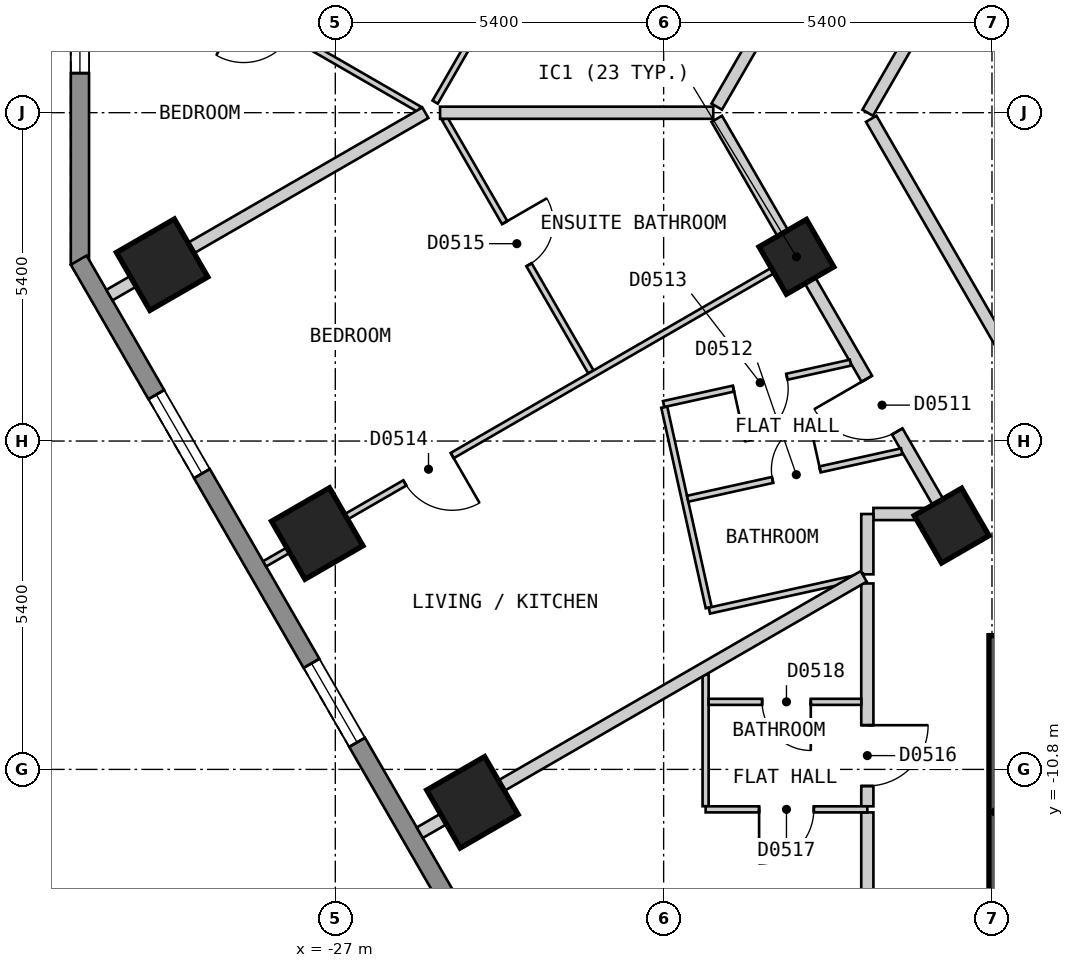
"""IFC4 building model, lengths in metres.
Left out: names, types, materials, properties, quantities, classifications, styles, units other than length and angle.
Written with IfcOpenShell. Run it as: python <this file> out.ifc"""

import sys

from ifc_helpers import new_model, si_unit, direction, frame, frame_2d, origin, origin_2d, place, context, subcontext, project, spatial, polyline, rectangle, outline, extrude, element, fill, save


model = new_model("IFC4")
c1 = context("Model", 3, precision=1e-05, world=origin(), true_north=direction((0.0, 1.0)))
c2 = subcontext(c1, "Body", "Model", "MODEL_VIEW")
j1 = project(units=[si_unit("LENGTHUNIT", "METRE"), si_unit("PLANEANGLEUNIT", "RADIAN")], contexts=[c1])
p1 = place(None, origin())
s1 = spatial("IfcSite", under=j1, at=p1, CompositionType="ELEMENT")
p2 = place(p1, origin())
s2 = spatial("IfcBuilding", under=s1, at=p2, CompositionType="ELEMENT")
p3 = place(p2, frame((0.0, 0.0, 44.4)))
s3 = spatial("IfcBuildingStorey", under=s2, at=p3, CompositionType="ELEMENT", Elevation=44.4)
for number, where, z_axis, x_axis in (
    (1, (-29.848, -2.5, 0.0), (0.0, 0.0, 1.0), (0.5, -0.866, 0.0)),
    (2, (-27.297, -6.921, 0.0), (0.0, 0.0, 1.0), (0.5, -0.866, 0.0)),
    (3, (-24.745, -11.341, 0.0), (0.0, 0.0, 1.0), (0.5, -0.866, 0.0)),
):
    element("IfcColumn", number, at=place(p3, frame(where, z_axis=z_axis, x_axis=x_axis)), inside=s3, PredefinedType="COLUMN", context=c2, shape_type="SweptSolid", body=[
        extrude(rectangle(XDim=1.1, YDim=1.1, at=origin_2d()), origin(), (0.0, 0.0, 1.0), 3.0),
    ])
for number, where, z_axis, x_axis in (
    (4, (-19.416, -2.371, 0.0), (0.0, 0.0, 1.0), (0.5, -0.866, 0.0)),
    (5, (-16.864, -6.791, 0.0), (0.0, 0.0, 1.0), (0.5, -0.866, 0.0)),
):
    element("IfcColumn", number, at=place(p3, frame(where, z_axis=z_axis, x_axis=x_axis)), inside=s3, PredefinedType="COLUMN", context=c2, shape_type="SweptSolid", body=[
        extrude(rectangle(XDim=0.9, YDim=0.9, at=origin_2d()), origin(), (0.0, 0.0, 1.0), 3.0),
    ])
p4 = place(p3, frame((-31.2, 2.5, 0.0), z_axis=(0.0, 0.0, 1.0), x_axis=(0.0, -1.0, 0.0)))
e6 = element("IfcWall", 6, at=p4, inside=s3, PredefinedType="SOLIDWALL", context=c2, shape_type="SweptSolid", body=[
    extrude(outline(polyline([(0.0, -0.15), (5.0, -0.15), (4.92, 0.15), (0.08, 0.15), (0.0, -0.15)])), origin(), (0.0, 0.0, 1.0), 2.7),
])
p5 = place(p4, frame((0.65, 0.0, 0.15)))
e7 = element("IfcOpeningElement", 7, at=p5, cuts=e6, PredefinedType="OPENING", context=c2, shape_type="SweptSolid", body=[
    extrude(rectangle(XDim=1.2, YDim=2.1, at=frame_2d((0.6, 1.05))), frame((0.0, 0.16, 0.0), z_axis=(0.0, -1.0, 0.0), x_axis=(1.0, 0.0, 0.0)), (0.0, 0.0, 1.0), 0.32),
])
p6 = place(p3, frame((-31.22, -2.425, 0.0), z_axis=(0.0, 0.0, 1.0), x_axis=(0.500001938803, -0.866024284413, 0.0)))
e8 = element("IfcWall", 8, at=p6, inside=s3, PredefinedType="SOLIDWALL", context=c2, shape_type="SweptSolid", body=[
    extrude(outline(polyline([(0.0, -0.15), (27.02, -0.15), (26.94, 0.15), (0.08, 0.15), (0.0, -0.15)])), origin(), (0.0, 0.0, 1.0), 2.7),
])
p7 = place(p6, frame((2.553, 0.0, 0.15)))
e9 = element("IfcOpeningElement", 9, at=p7, cuts=e8, PredefinedType="OPENING", context=c2, shape_type="SweptSolid", body=[
    extrude(rectangle(XDim=1.5, YDim=2.1, at=frame_2d((0.75, 1.05))), frame((0.0, 0.16, 0.0), z_axis=(0.0, -1.0, 0.0), x_axis=(1.0, 0.0, 0.0)), (0.0, 0.0, 1.0), 0.32),
])
p8 = place(p6, frame((7.657, 0.0, 0.15)))
e10 = element("IfcOpeningElement", 10, at=p8, cuts=e8, PredefinedType="OPENING", context=c2, shape_type="SweptSolid", body=[
    extrude(rectangle(XDim=1.5, YDim=2.1, at=frame_2d((0.75, 1.05))), frame((0.0, 0.16, 0.0), z_axis=(0.0, -1.0, 0.0), x_axis=(1.0, 0.0, 0.0)), (0.0, 0.0, 1.0), 0.32),
])
p9 = place(p6, frame((12.761, 0.0, 0.15)))
e11 = element("IfcOpeningElement", 11, at=p9, cuts=e8, PredefinedType="OPENING", context=c2, shape_type="SweptSolid", body=[
    extrude(rectangle(XDim=1.5, YDim=2.1, at=frame_2d((0.75, 1.05))), frame((0.0, 0.16, 0.0), z_axis=(0.0, -1.0, 0.0), x_axis=(1.0, 0.0, 0.0)), (0.0, 0.0, 1.0), 0.32),
])
p10 = place(p6, frame((17.865, 0.0, 0.15)))
e12 = element("IfcOpeningElement", 12, at=p10, cuts=e8, PredefinedType="OPENING", context=c2, shape_type="SweptSolid", body=[
    extrude(rectangle(XDim=1.5, YDim=2.1, at=frame_2d((0.75, 1.05))), frame((0.0, 0.16, 0.0), z_axis=(0.0, -1.0, 0.0), x_axis=(1.0, 0.0, 0.0)), (0.0, 0.0, 1.0), 0.32),
])
p11 = place(p6, frame((22.969, 0.0, 0.15)))
e13 = element("IfcOpeningElement", 13, at=p11, cuts=e8, PredefinedType="OPENING", context=c2, shape_type="SweptSolid", body=[
    extrude(rectangle(XDim=1.5, YDim=2.1, at=frame_2d((0.75, 1.05))), frame((0.0, 0.16, 0.0), z_axis=(0.0, -1.0, 0.0), x_axis=(1.0, 0.0, 0.0)), (0.0, 0.0, 1.0), 0.32),
])
p12 = place(p3, frame((-18.186, -0.101, 0.0), z_axis=(0.0, 0.0, 1.0), x_axis=(0.499997591167, -0.86602679452, 0.0)))
e14 = element("IfcWall", 14, at=p12, inside=s3, PredefinedType="PARTITIONING", context=c2, shape_type="SweptSolid", body=[
    extrude(rectangle(XDim=5.172, YDim=0.2, at=frame_2d((2.586, 0.0))), origin(), (0.0, 0.0, 1.0), 2.7),
])
p13 = place(p3, frame((-20.727, -0.101, 0.0), z_axis=(0.0, 0.0, 1.0), x_axis=(0.500065652488, -0.865987495984, 0.0)))
e15 = element("IfcWall", 15, at=p13, inside=s3, PredefinedType="PARTITIONING", context=c2, shape_type="SweptSolid", body=[
    extrude(rectangle(XDim=7.389, YDim=0.2, at=frame_2d((3.695, 0.0))), origin(), (0.0, 0.0, 1.0), 2.7),
])
p14 = place(p13, frame((4.937, 0.0, 0.0)))
e16 = element("IfcOpeningElement", 16, at=p14, cuts=e15, PredefinedType="OPENING", context=c2, shape_type="SweptSolid", body=[
    extrude(rectangle(XDim=1.0, YDim=2.1, at=frame_2d((0.5, 1.05))), frame((0.0, 0.11, 0.0), z_axis=(0.0, -1.0, 0.0), x_axis=(1.0, 0.0, 0.0)), (0.0, 0.0, 1.0), 0.22),
])
p15 = place(p3, frame((-18.25, -11.507, 0.0), z_axis=(0.0, 0.0, 1.0), x_axis=(0.0, -1.0, 0.0)))
e17 = element("IfcWall", 17, at=p15, inside=s3, PredefinedType="PARTITIONING", context=c2, shape_type="SweptSolid", body=[
    extrude(rectangle(XDim=4.792, YDim=0.2, at=frame_2d((2.396, 0.0))), origin(), (0.0, 0.0, 1.0), 2.7),
])
p16 = place(p3, frame((-18.15, -6.6, 0.0), z_axis=(0.0, 0.0, 1.0), x_axis=(1.0, 0.0, 0.0)))
e18 = element("IfcWall", 18, at=p16, inside=s3, PredefinedType="PARTITIONING", context=c2, shape_type="SweptSolid", body=[
    extrude(rectangle(XDim=1.176, YDim=0.2, at=frame_2d((0.588, 0.0))), origin(), (0.0, 0.0, 1.0), 2.7),
])
p17 = place(p3, frame((-18.244, -0.001, 0.0), z_axis=(0.0, 0.0, 1.0), x_axis=(0.499962999376, 0.866046765051, 0.0)))
e19 = element("IfcWall", 19, at=p17, inside=s3, PredefinedType="PARTITIONING", context=c2, shape_type="SweptSolid", body=[
    extrude(rectangle(XDim=18.245, YDim=0.2, at=frame_2d((9.123, 0.0))), origin(), (0.0, 0.0, 1.0), 2.7),
])
p18 = place(p17, frame((8.672, 0.0, 0.0)))
e20 = element("IfcOpeningElement", 20, at=p18, cuts=e19, PredefinedType="OPENING", context=c2, shape_type="SweptSolid", body=[
    extrude(rectangle(XDim=0.9, YDim=2.1, at=frame_2d((0.45, 1.05))), frame((0.0, 0.11, 0.0), z_axis=(0.0, -1.0, 0.0), x_axis=(1.0, 0.0, 0.0)), (0.0, 0.0, 1.0), 0.22),
])
p19 = place(p3, frame((-20.727, 0.099, 0.0), z_axis=(0.0, 0.0, 1.0), x_axis=(0.499993204491, 0.866029327138, 0.0)))
e21 = element("IfcWall", 21, at=p19, inside=s3, PredefinedType="PARTITIONING", context=c2, shape_type="SweptSolid", body=[
    extrude(rectangle(XDim=20.554, YDim=0.2, at=frame_2d((10.277, 0.0))), origin(), (0.0, 0.0, 1.0), 2.7),
])
p20 = place(p19, frame((9.776, 0.0, 0.0)))
e22 = element("IfcOpeningElement", 22, at=p20, cuts=e21, PredefinedType="OPENING", context=c2, shape_type="SweptSolid", body=[
    extrude(rectangle(XDim=1.0, YDim=2.1, at=frame_2d((0.5, 1.05))), frame((0.0, 0.11, 0.0), z_axis=(0.0, -1.0, 0.0), x_axis=(1.0, 0.0, 0.0)), (0.0, 0.0, 1.0), 0.22),
])
p21 = place(p19, frame((4.673, 0.0, 0.0)))
e23 = element("IfcOpeningElement", 23, at=p21, cuts=e21, PredefinedType="OPENING", context=c2, shape_type="SweptSolid", body=[
    extrude(rectangle(XDim=1.0, YDim=2.1, at=frame_2d((0.5, 1.05))), frame((0.0, 0.11, 0.0), z_axis=(0.0, -1.0, 0.0), x_axis=(1.0, 0.0, 0.0)), (0.0, 0.0, 1.0), 0.22),
])
p22 = place(p19, frame((14.88, 0.0, 0.0)))
e24 = element("IfcOpeningElement", 24, at=p22, cuts=e21, PredefinedType="OPENING", context=c2, shape_type="SweptSolid", body=[
    extrude(rectangle(XDim=1.0, YDim=2.1, at=frame_2d((0.5, 1.05))), frame((0.0, 0.11, 0.0), z_axis=(0.0, -1.0, 0.0), x_axis=(1.0, 0.0, 0.0)), (0.0, 0.0, 1.0), 0.22),
])
p23 = place(p3, frame((-18.25, -11.407, 0.0), z_axis=(0.0, 0.0, 1.0), x_axis=(0.0, 1.0, 0.0)))
e25 = element("IfcWall", 25, at=p23, inside=s3, PredefinedType="PARTITIONING", context=c2, shape_type="SweptSolid", body=[
    extrude(rectangle(XDim=3.665, YDim=0.2, at=frame_2d((1.833, 0.0))), origin(), (0.0, 0.0, 1.0), 2.7),
])
p24 = place(p23, frame((0.334, 0.0, 0.0)))
e26 = element("IfcOpeningElement", 26, at=p24, cuts=e25, PredefinedType="OPENING", context=c2, shape_type="SweptSolid", body=[
    extrude(rectangle(XDim=1.0, YDim=2.1, at=frame_2d((0.5, 1.05))), frame((0.0, 0.11, 0.0), z_axis=(0.0, -1.0, 0.0), x_axis=(1.0, 0.0, 0.0)), (0.0, 0.0, 1.0), 0.22),
])
p25 = place(p3, frame((-18.25, -7.592, 0.0), z_axis=(0.0, 0.0, 1.0), x_axis=(0.0, 1.0, 0.0)))
e27 = element("IfcWall", 27, at=p25, inside=s3, PredefinedType="PARTITIONING", context=c2, shape_type="SweptSolid", body=[
    extrude(rectangle(XDim=0.992, YDim=0.2, at=frame_2d((0.496, 0.0))), origin(), (0.0, 0.0, 1.0), 2.7),
])
p26 = place(p3, frame((-25.2, -0.101, 0.0), z_axis=(0.0, 0.0, 1.0), x_axis=(0.500099052605, -0.865968208183, 0.0)))
e28 = element("IfcWall", 28, at=p26, inside=s3, PredefinedType="PARTITIONING", context=c2, shape_type="SweptSolid", body=[
    extrude(rectangle(XDim=4.807, YDim=0.1, at=frame_2d((2.404, 0.0))), origin(), (0.0, 0.0, 1.0), 2.7),
])
p27 = place(p26, frame((1.971, 0.0, 0.0)))
e29 = element("IfcOpeningElement", 29, at=p27, cuts=e28, PredefinedType="OPENING", context=c2, shape_type="SweptSolid", body=[
    extrude(rectangle(XDim=0.8, YDim=2.1, at=frame_2d((0.4, 1.05))), frame((0.0, 0.06, 0.0), z_axis=(0.0, -1.0, 0.0), x_axis=(1.0, 0.0, 0.0)), (0.0, 0.0, 1.0), 0.12),
])
p28 = place(p3, frame((-21.59, -4.842, 0.0), z_axis=(0.0, 0.0, 1.0), x_axis=(0.216524734289, -0.976277132499, 0.0)))
e30 = element("IfcWall", 30, at=p28, inside=s3, PredefinedType="PARTITIONING", context=c2, shape_type="SweptSolid", body=[
    extrude(rectangle(XDim=3.377, YDim=0.1, at=frame_2d((1.688, 0.0))), origin(), (0.0, 0.0, 1.0), 2.7),
])
p29 = place(p3, frame((-20.91, -9.243, 0.0), z_axis=(0.0, 0.0, 1.0), x_axis=(0.0, -1.0, 0.0)))
e31 = element("IfcWall", 31, at=p29, inside=s3, PredefinedType="PARTITIONING", context=c2, shape_type="SweptSolid", body=[
    extrude(rectangle(XDim=2.163, YDim=0.1, at=frame_2d((1.082, 0.0))), origin(), (0.0, 0.0, 1.0), 2.7),
])
p30 = place(p3, frame((-30.716, 2.999, 0.0), z_axis=(0.0, 0.0, 1.0), x_axis=(0.866025981722, -0.499998998981, 0.0)))
e32 = element("IfcWall", 32, at=p30, inside=s3, PredefinedType="PARTITIONING", context=c2, shape_type="SweptSolid", body=[
    extrude(rectangle(XDim=5.884, YDim=0.1, at=frame_2d((2.942, 0.0))), origin(), (0.0, 0.0, 1.0), 2.7),
])
p31 = place(p30, frame((2.55, 0.0, 0.0)))
e33 = element("IfcOpeningElement", 33, at=p31, cuts=e32, PredefinedType="OPENING", context=c2, shape_type="SweptSolid", body=[
    extrude(rectangle(XDim=0.9, YDim=2.1, at=frame_2d((0.45, 1.05))), frame((0.0, 0.06, 0.0), z_axis=(0.0, -1.0, 0.0), x_axis=(1.0, 0.0, 0.0)), (0.0, 0.0, 1.0), 0.12),
])
p32 = place(p3, frame((-20.86, -9.689, 0.0), z_axis=(0.0, 0.0, 1.0), x_axis=(1.0, 0.0, 0.0)))
e34 = element("IfcWall", 34, at=p32, inside=s3, PredefinedType="PARTITIONING", context=c2, shape_type="SweptSolid", body=[
    extrude(rectangle(XDim=2.51, YDim=0.1, at=frame_2d((1.255, 0.0))), origin(), (0.0, 0.0, 1.0), 2.7),
])
p33 = place(p32, frame((0.88, 0.0, 0.0)))
e35 = element("IfcOpeningElement", 35, at=p33, cuts=e34, PredefinedType="OPENING", context=c2, shape_type="SweptSolid", body=[
    extrude(rectangle(XDim=0.8, YDim=2.1, at=frame_2d((0.4, 1.05))), frame((0.0, 0.06, 0.0), z_axis=(0.0, -1.0, 0.0), x_axis=(1.0, 0.0, 0.0)), (0.0, 0.0, 1.0), 0.12),
])
p34 = place(p3, frame((-20.909, -11.457, 0.0), z_axis=(0.0, 0.0, 1.0), x_axis=(1.0, 0.0, 0.0)))
e36 = element("IfcWall", 36, at=p34, inside=s3, PredefinedType="PARTITIONING", context=c2, shape_type="SweptSolid", body=[
    extrude(rectangle(XDim=2.659, YDim=0.1, at=frame_2d((1.33, 0.0))), origin(), (0.0, 0.0, 1.0), 2.7),
])
p35 = place(p34, frame((0.879, 0.0, 0.0)))
e37 = element("IfcOpeningElement", 37, at=p35, cuts=e36, PredefinedType="OPENING", context=c2, shape_type="SweptSolid", body=[
    extrude(rectangle(XDim=0.9, YDim=2.1, at=frame_2d((0.45, 1.05))), frame((0.0, 0.06, 0.0), z_axis=(0.0, -1.0, 0.0), x_axis=(1.0, 0.0, 0.0)), (0.0, 0.0, 1.0), 0.12),
])
p36 = place(p3, frame((-25.358, 0.173, 0.0), z_axis=(0.0, 0.0, 1.0), x_axis=(0.500180754623, 0.8659210199, 0.0)))
e38 = element("IfcWall", 38, at=p36, inside=s3, PredefinedType="PARTITIONING", context=c2, shape_type="SweptSolid", body=[
    extrude(rectangle(XDim=4.872, YDim=0.1, at=frame_2d((2.436, 0.0))), origin(), (0.0, 0.0, 1.0), 2.7),
])
p37 = place(p36, frame((1.936, 0.0, 0.0)))
e39 = element("IfcOpeningElement", 39, at=p37, cuts=e38, PredefinedType="OPENING", context=c2, shape_type="SweptSolid", body=[
    extrude(rectangle(XDim=0.8, YDim=2.1, at=frame_2d((0.4, 1.05))), frame((0.0, 0.06, 0.0), z_axis=(0.0, -1.0, 0.0), x_axis=(1.0, 0.0, 0.0)), (0.0, 0.0, 1.0), 0.12),
])
p38 = place(p3, frame((-20.848, -8.189, 0.0), z_axis=(0.0, 0.0, 1.0), x_axis=(0.976266547712, 0.216572453971, 0.0)))
e40 = element("IfcWall", 40, at=p38, inside=s3, PredefinedType="PARTITIONING", context=c2, shape_type="SweptSolid", body=[
    extrude(rectangle(XDim=2.6, YDim=0.1, at=frame_2d((1.3, 0.0))), origin(), (0.0, 0.0, 1.0), 2.7),
])
p39 = place(p3, frame((-21.205, -6.349, 0.0), z_axis=(0.0, 0.0, 1.0), x_axis=(0.976315944397, 0.216349663084, 0.0)))
e41 = element("IfcWall", 41, at=p39, inside=s3, PredefinedType="PARTITIONING", context=c2, shape_type="SweptSolid", body=[
    extrude(rectangle(XDim=3.605, YDim=0.1, at=frame_2d((1.803, 0.0))), origin(), (0.0, 0.0, 1.0), 2.7),
])
p40 = place(p39, frame((1.43, 0.0, 0.0)))
e42 = element("IfcOpeningElement", 42, at=p40, cuts=e41, PredefinedType="OPENING", context=c2, shape_type="SweptSolid", body=[
    extrude(rectangle(XDim=0.8, YDim=2.1, at=frame_2d((0.4, 1.05))), frame((0.0, 0.06, 0.0), z_axis=(0.0, -1.0, 0.0), x_axis=(1.0, 0.0, 0.0)), (0.0, 0.0, 1.0), 0.12),
])
p41 = place(p3, frame((-21.6, -4.792, 0.0), z_axis=(0.0, 0.0, 1.0), x_axis=(0.976320106661, 0.216330879278, 0.0)))
e43 = element("IfcWall", 43, at=p41, inside=s3, PredefinedType="PARTITIONING", context=c2, shape_type="SweptSolid", body=[
    extrude(rectangle(XDim=3.147, YDim=0.1, at=frame_2d((1.574, 0.0))), origin(), (0.0, 0.0, 1.0), 2.7),
])
p42 = place(p41, frame((1.176, 0.0, 0.0)))
e44 = element("IfcOpeningElement", 44, at=p42, cuts=e43, PredefinedType="OPENING", context=c2, shape_type="SweptSolid", body=[
    extrude(rectangle(XDim=0.9, YDim=2.1, at=frame_2d((0.45, 1.05))), frame((0.0, 0.06, 0.0), z_axis=(0.0, -1.0, 0.0), x_axis=(1.0, 0.0, 0.0)), (0.0, 0.0, 1.0), 0.12),
])
p43 = place(p3, frame((-28.163, -7.42, 0.0), z_axis=(0.0, 0.0, 1.0), x_axis=(0.866065245018, 0.499930986609, 0.0)))
e45 = element("IfcWall", 45, at=p43, inside=s3, PredefinedType="PARTITIONING", context=c2, shape_type="SweptSolid", body=[
    extrude(rectangle(XDim=10.0, YDim=0.1, at=frame_2d((5.0, 0.0))), origin(), (0.0, 0.0, 1.0), 2.7),
])
p44 = place(p43, frame((2.663, 0.0, 0.0)))
e46 = element("IfcOpeningElement", 46, at=p44, cuts=e45, PredefinedType="OPENING", context=c2, shape_type="SweptSolid", body=[
    extrude(rectangle(XDim=0.9, YDim=2.1, at=frame_2d((0.45, 1.05))), frame((0.0, 0.06, 0.0), z_axis=(0.0, -1.0, 0.0), x_axis=(1.0, 0.0, 0.0)), (0.0, 0.0, 1.0), 0.12),
])
p45 = place(p3, frame((-25.277, -0.001, 0.0), z_axis=(0.0, 0.0, 1.0), x_axis=(1.0, 0.0, 0.0)))
e47 = element("IfcWall", 47, at=p45, inside=s3, PredefinedType="PARTITIONING", context=c2, shape_type="SweptSolid", body=[
    extrude(rectangle(XDim=4.493, YDim=0.2, at=frame_2d((2.247, 0.0))), origin(), (0.0, 0.0, 1.0), 2.7),
])
p46 = place(p3, frame((-30.715, -3.0, 0.0), z_axis=(0.0, 0.0, 1.0), x_axis=(0.86609140076, 0.499885672459, 0.0)))
e48 = element("IfcWall", 48, at=p46, inside=s3, PredefinedType="PARTITIONING", context=c2, shape_type="SweptSolid", body=[
    extrude(rectangle(XDim=6.0, YDim=0.2, at=frame_2d((3.0, 0.0))), origin(), (0.0, 0.0, 1.0), 2.7),
])
p47 = place(p3, frame((-25.61, -11.841, 0.0), z_axis=(0.0, 0.0, 1.0), x_axis=(0.866004715254, 0.500035831874, 0.0)))
e49 = element("IfcWall", 49, at=p47, inside=s3, PredefinedType="PARTITIONING", context=c2, shape_type="SweptSolid", body=[
    extrude(rectangle(XDim=8.43, YDim=0.2, at=frame_2d((4.215, 0.0))), origin(), (0.0, 0.0, 1.0), 2.7),
])
p48 = place(p3, frame((-16.15, -14.4, 0.0), z_axis=(0.0, 0.0, 1.0), x_axis=(0.0, 1.0, 0.0)))
e50 = element("IfcWall", 50, at=p48, inside=s3, PredefinedType="SOLIDWALL", context=c2, shape_type="SweptSolid", body=[
    extrude(rectangle(XDim=5.8, YDim=0.2, at=frame_2d((2.9, 0.0))), origin(), (0.0, 0.0, 1.0), 2.7),
])
p49 = place(p5, origin())
e51 = element("IfcWindow", 51, at=p49, inside=s3, PartitioningType="SINGLE_PANEL", PredefinedType="WINDOW", context=c2, shape_type="SweptSolid", body=[
    extrude(rectangle(XDim=1.2, YDim=2.1, at=frame_2d((0.6, 1.05))), frame((0.0, 0.03, 0.0), z_axis=(0.0, -1.0, 0.0), x_axis=(1.0, 0.0, 0.0)), (0.0, 0.0, 1.0), 0.06),
])
fill(e7, e51)
p50 = place(p7, origin())
e52 = element("IfcWindow", 52, at=p50, inside=s3, PartitioningType="SINGLE_PANEL", PredefinedType="WINDOW", context=c2, shape_type="SweptSolid", body=[
    extrude(rectangle(XDim=1.5, YDim=2.1, at=frame_2d((0.75, 1.05))), frame((0.0, 0.03, 0.0), z_axis=(0.0, -1.0, 0.0), x_axis=(1.0, 0.0, 0.0)), (0.0, 0.0, 1.0), 0.06),
])
fill(e9, e52)
p51 = place(p8, origin())
e53 = element("IfcWindow", 53, at=p51, inside=s3, PartitioningType="SINGLE_PANEL", PredefinedType="WINDOW", context=c2, shape_type="SweptSolid", body=[
    extrude(rectangle(XDim=1.5, YDim=2.1, at=frame_2d((0.75, 1.05))), frame((0.0, 0.03, 0.0), z_axis=(0.0, -1.0, 0.0), x_axis=(1.0, 0.0, 0.0)), (0.0, 0.0, 1.0), 0.06),
])
fill(e10, e53)
p52 = place(p14, origin())
e54 = element("IfcDoor", 54, at=p52, inside=s3, OperationType="SINGLE_SWING_LEFT", PredefinedType="DOOR", context=c2, shape_type="SweptSolid", body=[
    extrude(rectangle(XDim=1.0, YDim=2.1, at=frame_2d((0.5, 1.05))), frame((0.0, 0.025, 0.0), z_axis=(0.0, -1.0, 0.0), x_axis=(1.0, 0.0, 0.0)), (0.0, 0.0, 1.0), 0.05),
])
fill(e16, e54)
p53 = place(p40, origin())
e55 = element("IfcDoor", 55, at=p53, inside=s3, OperationType="SINGLE_SWING_RIGHT", PredefinedType="DOOR", context=c2, shape_type="SweptSolid", body=[
    extrude(rectangle(XDim=0.8, YDim=2.1, at=frame_2d((0.4, 1.05))), frame((0.0, 0.025, 0.0), z_axis=(0.0, -1.0, 0.0), x_axis=(1.0, 0.0, 0.0)), (0.0, 0.0, 1.0), 0.05),
])
fill(e42, e55)
p54 = place(p42, origin())
e56 = element("IfcDoor", 56, at=p54, inside=s3, OperationType="SINGLE_SWING_LEFT", PredefinedType="DOOR", context=c2, shape_type="SweptSolid", body=[
    extrude(rectangle(XDim=0.9, YDim=2.1, at=frame_2d((0.45, 1.05))), frame((0.0, 0.025, 0.0), z_axis=(0.0, -1.0, 0.0), x_axis=(1.0, 0.0, 0.0)), (0.0, 0.0, 1.0), 0.05),
])
fill(e44, e56)
p55 = place(p44, origin())
e57 = element("IfcDoor", 57, at=p55, inside=s3, OperationType="SINGLE_SWING_RIGHT", PredefinedType="DOOR", context=c2, shape_type="SweptSolid", body=[
    extrude(rectangle(XDim=0.9, YDim=2.1, at=frame_2d((0.45, 1.05))), frame((0.0, 0.025, 0.0), z_axis=(0.0, -1.0, 0.0), x_axis=(1.0, 0.0, 0.0)), (0.0, 0.0, 1.0), 0.05),
])
fill(e46, e57)
p56 = place(p27, origin())
e58 = element("IfcDoor", 58, at=p56, inside=s3, OperationType="SINGLE_SWING_LEFT", PredefinedType="DOOR", context=c2, shape_type="SweptSolid", body=[
    extrude(rectangle(XDim=0.8, YDim=2.1, at=frame_2d((0.4, 1.05))), frame((0.0, 0.025, 0.0), z_axis=(0.0, -1.0, 0.0), x_axis=(1.0, 0.0, 0.0)), (0.0, 0.0, 1.0), 0.05),
])
fill(e29, e58)
p57 = place(p24, origin())
e59 = element("IfcDoor", 59, at=p57, inside=s3, OperationType="SINGLE_SWING_RIGHT", PredefinedType="DOOR", context=c2, shape_type="SweptSolid", body=[
    extrude(rectangle(XDim=1.0, YDim=2.1, at=frame_2d((0.5, 1.05))), frame((0.0, 0.025, 0.0), z_axis=(0.0, -1.0, 0.0), x_axis=(1.0, 0.0, 0.0)), (0.0, 0.0, 1.0), 0.05),
])
fill(e26, e59)
p58 = place(p35, origin())
e60 = element("IfcDoor", 60, at=p58, inside=s3, OperationType="SINGLE_SWING_LEFT", PredefinedType="DOOR", context=c2, shape_type="SweptSolid", body=[
    extrude(rectangle(XDim=0.9, YDim=2.1, at=frame_2d((0.45, 1.05))), frame((0.0, 0.025, 0.0), z_axis=(0.0, -1.0, 0.0), x_axis=(1.0, 0.0, 0.0)), (0.0, 0.0, 1.0), 0.05),
])
fill(e37, e60)
p59 = place(p33, origin())
e61 = element("IfcDoor", 61, at=p59, inside=s3, OperationType="SINGLE_SWING_RIGHT", PredefinedType="DOOR", context=c2, shape_type="SweptSolid", body=[
    extrude(rectangle(XDim=0.8, YDim=2.1, at=frame_2d((0.4, 1.05))), frame((0.0, 0.025, 0.0), z_axis=(0.0, -1.0, 0.0), x_axis=(1.0, 0.0, 0.0)), (0.0, 0.0, 1.0), 0.05),
])
fill(e35, e61)
save(model, sys.argv[1])
